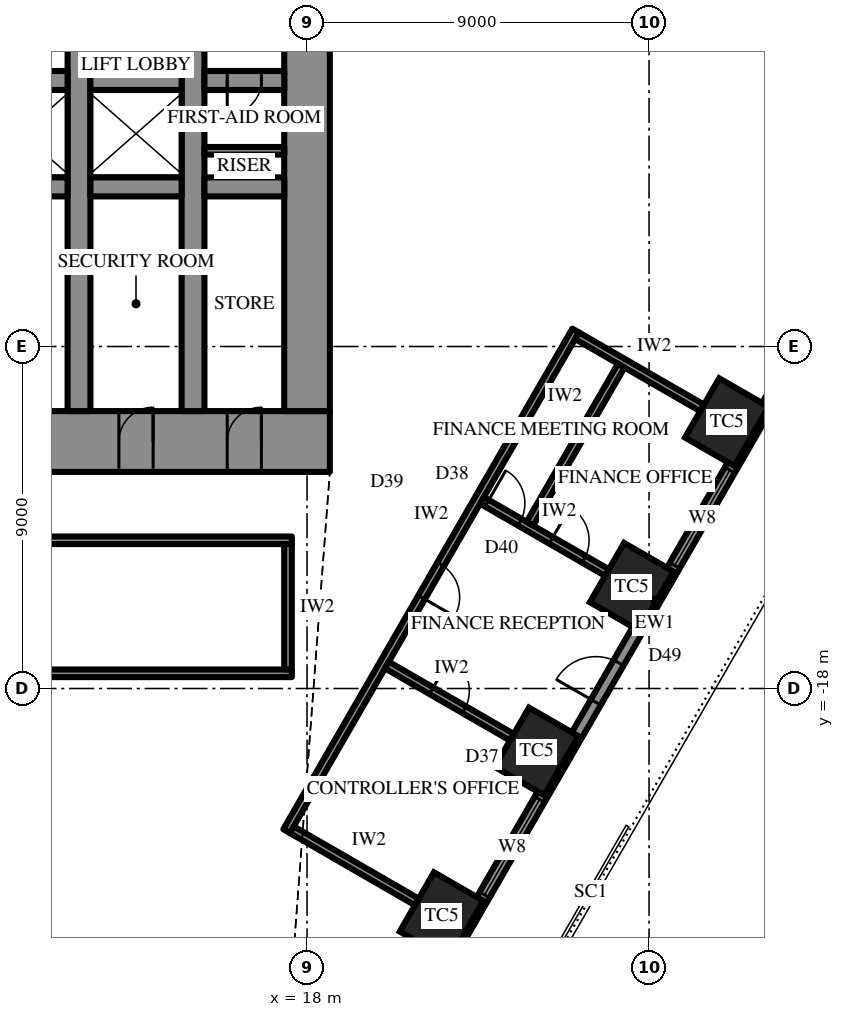
"""IFC4 building model, lengths in metres.
Left out: names, types, materials, properties, quantities, classifications, styles, units other than length and angle.
Written with IfcOpenShell. Run it as: python <this file> out.ifc"""

import sys

from ifc_helpers import new_model, si_unit, direction, frame, frame_2d, origin, origin_2d, place, context, subcontext, project, spatial, rectangle, extrude, element, fill, save


model = new_model("IFC4")
c1 = context("Model", 3, precision=1e-05, world=origin(), true_north=direction((0.0, 1.0)))
c2 = subcontext(c1, "Body", "Model", "MODEL_VIEW")
j1 = project(units=[si_unit("LENGTHUNIT", "METRE"), si_unit("PLANEANGLEUNIT", "RADIAN")], contexts=[c1])
p1 = place(None, origin())
s1 = spatial("IfcSite", under=j1, at=p1, CompositionType="ELEMENT")
p2 = place(p1, origin())
s2 = spatial("IfcBuilding", under=s1, at=p2, CompositionType="ELEMENT")
p3 = place(p2, frame((0.0, 0.0, 123.7)))
s3 = spatial("IfcBuildingStorey", under=s2, at=p3, CompositionType="ELEMENT", Elevation=123.7)
for number, where, z_axis, x_axis in (
    (1, (21.54, -23.992, 0.0), (0.0, 0.0, 1.0), (0.5, 0.866, 0.0)),
    (2, (24.042, -19.658, 0.0), (0.0, 0.0, 1.0), (0.5, 0.866, 0.0)),
    (3, (26.544, -15.325, 0.0), (0.0, 0.0, 1.0), (0.5, 0.866, 0.0)),
    (4, (29.045, -10.992, 0.0), (0.0, 0.0, 1.0), (0.5, 0.866, 0.0)),
):
    element("IfcColumn", number, at=place(p3, frame(where, z_axis=z_axis, x_axis=x_axis)), inside=s3, PredefinedType="COLUMN", context=c2, shape_type="SweptSolid", body=[
        extrude(rectangle(XDim=1.8, YDim=1.5, at=origin_2d()), origin(), (0.0, 0.0, 1.0), 4.2),
    ])
p4 = place(p3, frame((18.6, -11.5, 0.0), z_axis=(0.0, 0.0, 1.0), x_axis=(-1.0, 0.0, 0.0)))
e5 = element("IfcWall", 5, at=p4, inside=s3, PredefinedType="SHEAR", context=c2, shape_type="SweptSolid", body=[
    extrude(rectangle(XDim=37.2, YDim=1.6, at=frame_2d((18.6, 0.0))), origin(), (0.0, 0.0, 1.0), 4.2),
])
p5 = place(p4, frame((19.45, 0.0, 0.0)))
e6 = element("IfcOpeningElement", 6, at=p5, cuts=e5, PredefinedType="OPENING", context=c2, shape_type="SweptSolid", body=[
    extrude(rectangle(XDim=0.9, YDim=2.2, at=frame_2d((0.45, 1.1))), frame((0.0, 0.81, 0.0), z_axis=(0.0, -1.0, 0.0), x_axis=(1.0, 0.0, 0.0)), (0.0, 0.0, 1.0), 1.62),
])
p6 = place(p4, frame((22.45, 0.0, 0.0)))
e7 = element("IfcOpeningElement", 7, at=p6, cuts=e5, PredefinedType="OPENING", context=c2, shape_type="SweptSolid", body=[
    extrude(rectangle(XDim=0.9, YDim=2.2, at=frame_2d((0.45, 1.1))), frame((0.0, 0.81, 0.0), z_axis=(0.0, -1.0, 0.0), x_axis=(1.0, 0.0, 0.0)), (0.0, 0.0, 1.0), 1.62),
])
p7 = place(p4, frame((25.5, 0.0, 0.0)))
e8 = element("IfcOpeningElement", 8, at=p7, cuts=e5, PredefinedType="OPENING", context=c2, shape_type="SweptSolid", body=[
    extrude(rectangle(XDim=1.0, YDim=2.2, at=frame_2d((0.5, 1.1))), frame((0.0, 0.81, 0.0), z_axis=(0.0, -1.0, 0.0), x_axis=(1.0, 0.0, 0.0)), (0.0, 0.0, 1.0), 1.62),
])
p8 = place(p4, frame((1.8, 0.0, 0.0)))
e9 = element("IfcOpeningElement", 9, at=p8, cuts=e5, PredefinedType="OPENING", context=c2, shape_type="SweptSolid", body=[
    extrude(rectangle(XDim=0.9, YDim=2.2, at=frame_2d((0.45, 1.1))), frame((0.0, 0.81, 0.0), z_axis=(0.0, -1.0, 0.0), x_axis=(1.0, 0.0, 0.0)), (0.0, 0.0, 1.0), 1.62),
])
p9 = place(p4, frame((4.65, 0.0, 0.0)))
e10 = element("IfcOpeningElement", 10, at=p9, cuts=e5, PredefinedType="OPENING", context=c2, shape_type="SweptSolid", body=[
    extrude(rectangle(XDim=0.9, YDim=2.2, at=frame_2d((0.45, 1.1))), frame((0.0, 0.81, 0.0), z_axis=(0.0, -1.0, 0.0), x_axis=(1.0, 0.0, 0.0)), (0.0, 0.0, 1.0), 1.62),
])
p10 = place(p4, frame((7.75, 0.0, 0.0)))
e11 = element("IfcOpeningElement", 11, at=p10, cuts=e5, PredefinedType="OPENING", context=c2, shape_type="SweptSolid", body=[
    extrude(rectangle(XDim=0.9, YDim=2.2, at=frame_2d((0.45, 1.1))), frame((0.0, 0.81, 0.0), z_axis=(0.0, -1.0, 0.0), x_axis=(1.0, 0.0, 0.0)), (0.0, 0.0, 1.0), 1.62),
])
p11 = place(p4, frame((28.55, 0.0, 0.0)))
e12 = element("IfcOpeningElement", 12, at=p11, cuts=e5, PredefinedType="OPENING", context=c2, shape_type="SweptSolid", body=[
    extrude(rectangle(XDim=0.9, YDim=2.2, at=frame_2d((0.45, 1.1))), frame((0.0, 0.81, 0.0), z_axis=(0.0, -1.0, 0.0), x_axis=(1.0, 0.0, 0.0)), (0.0, 0.0, 1.0), 1.62),
])
p12 = place(p4, frame((31.65, 0.0, 0.0)))
e13 = element("IfcOpeningElement", 13, at=p12, cuts=e5, PredefinedType="OPENING", context=c2, shape_type="SweptSolid", body=[
    extrude(rectangle(XDim=0.9, YDim=2.2, at=frame_2d((0.45, 1.1))), frame((0.0, 0.81, 0.0), z_axis=(0.0, -1.0, 0.0), x_axis=(1.0, 0.0, 0.0)), (0.0, 0.0, 1.0), 1.62),
])
p13 = place(p4, frame((34.5, 0.0, 0.0)))
e14 = element("IfcOpeningElement", 14, at=p13, cuts=e5, PredefinedType="OPENING", context=c2, shape_type="SweptSolid", body=[
    extrude(rectangle(XDim=0.9, YDim=2.2, at=frame_2d((0.45, 1.1))), frame((0.0, 0.81, 0.0), z_axis=(0.0, -1.0, 0.0), x_axis=(1.0, 0.0, 0.0)), (0.0, 0.0, 1.0), 1.62),
])
p14 = place(p3, frame((18.0, -10.7, 0.0), z_axis=(0.0, 0.0, 1.0), x_axis=(0.0, 1.0, 0.0)))
e15 = element("IfcWall", 15, at=p14, inside=s3, PredefinedType="SHEAR", context=c2, shape_type="SweptSolid", body=[
    extrude(rectangle(XDim=21.4, YDim=1.2, at=frame_2d((10.7, 0.0))), origin(), (0.0, 0.0, 1.0), 4.2),
])
p15 = place(p14, frame((9.8, 0.0, 0.0)))
e16 = element("IfcOpeningElement", 16, at=p15, cuts=e15, PredefinedType="OPENING", context=c2, shape_type="SweptSolid", body=[
    extrude(rectangle(XDim=1.8, YDim=2.4, at=frame_2d((0.9, 1.2))), frame((0.0, 0.61, 0.0), z_axis=(0.0, -1.0, 0.0), x_axis=(1.0, 0.0, 0.0)), (0.0, 0.0, 1.0), 1.22),
])
p16 = place(p3, frame((12.0, -10.7, 0.0), z_axis=(0.0, 0.0, 1.0), x_axis=(0.0, 1.0, 0.0)))
e17 = element("IfcWall", 17, at=p16, inside=s3, PredefinedType="SHEAR", context=c2, shape_type="SweptSolid", body=[
    extrude(rectangle(XDim=21.4, YDim=0.6, at=frame_2d((10.7, 0.0))), origin(), (0.0, 0.0, 1.0), 4.2),
])
p17 = place(p16, frame((9.8, 0.0, 0.0)))
e18 = element("IfcOpeningElement", 18, at=p17, cuts=e17, PredefinedType="OPENING", context=c2, shape_type="SweptSolid", body=[
    extrude(rectangle(XDim=1.8, YDim=2.4, at=frame_2d((0.9, 1.2))), frame((0.0, 0.31, 0.0), z_axis=(0.0, -1.0, 0.0), x_axis=(1.0, 0.0, 0.0)), (0.0, 0.0, 1.0), 0.62),
])
p18 = place(p3, frame((15.0, -10.7, 0.0), z_axis=(0.0, 0.0, 1.0), x_axis=(0.0, 1.0, 0.0)))
e19 = element("IfcWall", 19, at=p18, inside=s3, PredefinedType="SHEAR", context=c2, shape_type="SweptSolid", body=[
    extrude(rectangle(XDim=21.4, YDim=0.6, at=frame_2d((10.7, 0.0))), origin(), (0.0, 0.0, 1.0), 4.2),
])
p19 = place(p18, frame((9.8, 0.0, 0.0)))
e20 = element("IfcOpeningElement", 20, at=p19, cuts=e19, PredefinedType="OPENING", context=c2, shape_type="SweptSolid", body=[
    extrude(rectangle(XDim=1.8, YDim=2.4, at=frame_2d((0.9, 1.2))), frame((0.0, 0.31, 0.0), z_axis=(0.0, -1.0, 0.0), x_axis=(1.0, 0.0, 0.0)), (0.0, 0.0, 1.0), 0.62),
])
p20 = place(p3, frame((17.4, -2.0, 0.0), z_axis=(0.0, 0.0, 1.0), x_axis=(-1.0, 0.0, 0.0)))
e21 = element("IfcWall", 21, at=p20, inside=s3, PredefinedType="SHEAR", context=c2, shape_type="SweptSolid", body=[
    extrude(rectangle(XDim=2.1, YDim=0.5, at=frame_2d((1.05, 0.0))), origin(), (0.0, 0.0, 1.0), 4.2),
])
p21 = place(p20, frame((0.6, 0.0, 0.0)))
e22 = element("IfcOpeningElement", 22, at=p21, cuts=e21, PredefinedType="OPENING", context=c2, shape_type="SweptSolid", body=[
    extrude(rectangle(XDim=0.9, YDim=2.2, at=frame_2d((0.45, 1.1))), frame((0.0, 0.26, 0.0), z_axis=(0.0, -1.0, 0.0), x_axis=(1.0, 0.0, 0.0)), (0.0, 0.0, 1.0), 0.52),
])
p22 = place(p3, frame((14.7, -2.0, 0.0), z_axis=(0.0, 0.0, 1.0), x_axis=(-1.0, 0.0, 0.0)))
e23 = element("IfcWall", 23, at=p22, inside=s3, PredefinedType="SHEAR", context=c2, shape_type="SweptSolid", body=[
    extrude(rectangle(XDim=2.4, YDim=0.5, at=frame_2d((1.2, 0.0))), origin(), (0.0, 0.0, 1.0), 4.2),
])
p23 = place(p3, frame((11.7, -2.0, 0.0), z_axis=(0.0, 0.0, 1.0), x_axis=(-1.0, 0.0, 0.0)))
e24 = element("IfcWall", 24, at=p23, inside=s3, PredefinedType="SHEAR", context=c2, shape_type="SweptSolid", body=[
    extrude(rectangle(XDim=5.9, YDim=0.5, at=frame_2d((2.95, 0.0))), origin(), (0.0, 0.0, 1.0), 4.2),
])
p24 = place(p3, frame((17.4, -4.8, 0.0), z_axis=(0.0, 0.0, 1.0), x_axis=(-1.0, 0.0, 0.0)))
e25 = element("IfcWall", 25, at=p24, inside=s3, PredefinedType="SHEAR", context=c2, shape_type="SweptSolid", body=[
    extrude(rectangle(XDim=2.1, YDim=0.5, at=frame_2d((1.05, 0.0))), origin(), (0.0, 0.0, 1.0), 4.2),
])
p25 = place(p3, frame((14.7, -4.8, 0.0), z_axis=(0.0, 0.0, 1.0), x_axis=(-1.0, 0.0, 0.0)))
e26 = element("IfcWall", 26, at=p25, inside=s3, PredefinedType="SHEAR", context=c2, shape_type="SweptSolid", body=[
    extrude(rectangle(XDim=2.4, YDim=0.5, at=frame_2d((1.2, 0.0))), origin(), (0.0, 0.0, 1.0), 4.2),
])
p26 = place(p3, frame((11.7, -4.8, 0.0), z_axis=(0.0, 0.0, 1.0), x_axis=(-1.0, 0.0, 0.0)))
e27 = element("IfcWall", 27, at=p26, inside=s3, PredefinedType="SHEAR", context=c2, shape_type="SweptSolid", body=[
    extrude(rectangle(XDim=23.4, YDim=0.5, at=frame_2d((11.7, 0.0))), origin(), (0.0, 0.0, 1.0), 4.2),
])
p27 = place(p26, frame((6.6, 0.0, 0.0)))
e28 = element("IfcOpeningElement", 28, at=p27, cuts=e27, PredefinedType="OPENING", context=c2, shape_type="SweptSolid", body=[
    extrude(rectangle(XDim=1.2, YDim=2.2, at=frame_2d((0.6, 1.1))), frame((0.0, 0.26, 0.0), z_axis=(0.0, -1.0, 0.0), x_axis=(1.0, 0.0, 0.0)), (0.0, 0.0, 1.0), 0.52),
])
p28 = place(p26, frame((3.6, 0.0, 0.0)))
e29 = element("IfcOpeningElement", 29, at=p28, cuts=e27, PredefinedType="OPENING", context=c2, shape_type="SweptSolid", body=[
    extrude(rectangle(XDim=1.2, YDim=2.2, at=frame_2d((0.6, 1.1))), frame((0.0, 0.26, 0.0), z_axis=(0.0, -1.0, 0.0), x_axis=(1.0, 0.0, 0.0)), (0.0, 0.0, 1.0), 0.52),
])
p29 = place(p3, frame((19.644, -28.675, 0.0), z_axis=(0.0, 0.0, 1.0), x_axis=(0.500003084452, 0.866023622968, 0.0)))
e30 = element("IfcWall", 30, at=p29, inside=s3, PredefinedType="SOLIDWALL", context=c2, shape_type="SweptSolid", body=[
    extrude(rectangle(XDim=30.022, YDim=0.3, at=frame_2d((15.011, 0.0))), origin(), (0.0, 0.0, 1.0), 2.3),
])
p30 = place(p29, frame((1.052, 0.0, 0.6)))
e31 = element("IfcOpeningElement", 31, at=p30, cuts=e30, PredefinedType="OPENING", context=c2, shape_type="SweptSolid", body=[
    extrude(rectangle(XDim=2.9, YDim=1.45, at=frame_2d((1.45, 0.725))), frame((0.0, 0.16, 0.0), z_axis=(0.0, -1.0, 0.0), x_axis=(1.0, 0.0, 0.0)), (0.0, 0.0, 1.0), 0.32),
])
p31 = place(p29, frame((6.056, 0.0, 0.6)))
e32 = element("IfcOpeningElement", 32, at=p31, cuts=e30, PredefinedType="OPENING", context=c2, shape_type="SweptSolid", body=[
    extrude(rectangle(XDim=2.9, YDim=1.45, at=frame_2d((1.45, 0.725))), frame((0.0, 0.16, 0.0), z_axis=(0.0, -1.0, 0.0), x_axis=(1.0, 0.0, 0.0)), (0.0, 0.0, 1.0), 0.32),
])
p32 = place(p29, frame((11.909, 0.0, 0.0)))
e33 = element("IfcOpeningElement", 33, at=p32, cuts=e30, PredefinedType="OPENING", context=c2, shape_type="SweptSolid", body=[
    extrude(rectangle(XDim=1.2, YDim=2.2, at=frame_2d((0.6, 1.1))), frame((0.0, 0.16, 0.0), z_axis=(0.0, -1.0, 0.0), x_axis=(1.0, 0.0, 0.0)), (0.0, 0.0, 1.0), 0.32),
])
p33 = place(p29, frame((16.063, 0.0, 0.6)))
e34 = element("IfcOpeningElement", 34, at=p33, cuts=e30, PredefinedType="OPENING", context=c2, shape_type="SweptSolid", body=[
    extrude(rectangle(XDim=2.9, YDim=1.45, at=frame_2d((1.45, 0.725))), frame((0.0, 0.16, 0.0), z_axis=(0.0, -1.0, 0.0), x_axis=(1.0, 0.0, 0.0)), (0.0, 0.0, 1.0), 0.32),
])
p34 = place(p29, frame((21.067, 0.0, 0.6)))
e35 = element("IfcOpeningElement", 35, at=p34, cuts=e30, PredefinedType="OPENING", context=c2, shape_type="SweptSolid", body=[
    extrude(rectangle(XDim=2.9, YDim=1.45, at=frame_2d((1.45, 0.725))), frame((0.0, 0.16, 0.0), z_axis=(0.0, -1.0, 0.0), x_axis=(1.0, 0.0, 0.0)), (0.0, 0.0, 1.0), 0.32),
])
p35 = place(p29, frame((26.07, 0.0, 0.6)))
e36 = element("IfcOpeningElement", 36, at=p35, cuts=e30, PredefinedType="OPENING", context=c2, shape_type="SweptSolid", body=[
    extrude(rectangle(XDim=2.9, YDim=1.45, at=frame_2d((1.45, 0.725))), frame((0.0, 0.16, 0.0), z_axis=(0.0, -1.0, 0.0), x_axis=(1.0, 0.0, 0.0)), (0.0, 0.0, 1.0), 0.32),
])
p36 = place(p3, frame((17.4, -3.85, 0.0), z_axis=(0.0, 0.0, 1.0), x_axis=(-1.0, 0.0, 0.0)))
e37 = element("IfcWall", 37, at=p36, inside=s3, PredefinedType="PARTITIONING", context=c2, shape_type="SweptSolid", body=[
    extrude(rectangle(XDim=2.1, YDim=0.2, at=frame_2d((1.05, 0.0))), origin(), (0.0, 0.0, 1.0), 4.0),
])
p37 = place(p3, frame((17.6, -14.1, 0.0), z_axis=(0.0, 0.0, 1.0), x_axis=(-1.0, 0.0, 0.0)))
e38 = element("IfcWall", 38, at=p37, inside=s3, PredefinedType="PARTITIONING", context=c2, shape_type="SweptSolid", body=[
    extrude(rectangle(XDim=35.2, YDim=0.2, at=frame_2d((17.6, 0.0))), origin(), (0.0, 0.0, 1.0), 4.0),
])
p38 = place(p3, frame((17.6, -17.6, 0.0), z_axis=(0.0, 0.0, 1.0), x_axis=(-1.0, 0.0, 0.0)))
e39 = element("IfcWall", 39, at=p38, inside=s3, PredefinedType="PARTITIONING", context=c2, shape_type="SweptSolid", body=[
    extrude(rectangle(XDim=35.2, YDim=0.2, at=frame_2d((17.6, 0.0))), origin(), (0.0, 0.0, 1.0), 4.0),
])
p39 = place(p38, frame((7.95, 0.0, 0.0)))
e40 = element("IfcOpeningElement", 40, at=p39, cuts=e39, PredefinedType="OPENING", context=c2, shape_type="SweptSolid", body=[
    extrude(rectangle(XDim=1.8, YDim=2.4, at=frame_2d((0.9, 1.2))), frame((0.0, 0.11, 0.0), z_axis=(0.0, -1.0, 0.0), x_axis=(1.0, 0.0, 0.0)), (0.0, 0.0, 1.0), 0.22),
])
p40 = place(p38, frame((25.45, 0.0, 0.0)))
e41 = element("IfcOpeningElement", 41, at=p40, cuts=e39, PredefinedType="OPENING", context=c2, shape_type="SweptSolid", body=[
    extrude(rectangle(XDim=1.8, YDim=2.4, at=frame_2d((0.9, 1.2))), frame((0.0, 0.11, 0.0), z_axis=(0.0, -1.0, 0.0), x_axis=(1.0, 0.0, 0.0)), (0.0, 0.0, 1.0), 0.22),
])
p41 = place(p3, frame((17.5, -14.2, 0.0), z_axis=(0.0, 0.0, 1.0), x_axis=(0.0, -1.0, 0.0)))
e42 = element("IfcWall", 42, at=p41, inside=s3, PredefinedType="PARTITIONING", context=c2, shape_type="SweptSolid", body=[
    extrude(rectangle(XDim=3.3, YDim=0.2, at=frame_2d((1.65, 0.0))), origin(), (0.0, 0.0, 1.0), 4.0),
])
p42 = place(p3, frame((17.463, -21.753, 0.0), z_axis=(0.0, 0.0, 1.0), x_axis=(0.500010972563, 0.86601906868, 0.0)))
e43 = element("IfcWall", 43, at=p42, inside=s3, PredefinedType="PARTITIONING", context=c2, shape_type="SweptSolid", body=[
    extrude(rectangle(XDim=15.211, YDim=0.2, at=frame_2d((7.605, 0.0))), origin(), (0.0, 0.0, 1.0), 4.0),
])
p43 = place(p42, frame((7.105, 0.0, 0.0)))
e44 = element("IfcOpeningElement", 44, at=p43, cuts=e43, PredefinedType="OPENING", context=c2, shape_type="SweptSolid", body=[
    extrude(rectangle(XDim=1.0, YDim=2.2, at=frame_2d((0.5, 1.1))), frame((0.0, 0.11, 0.0), z_axis=(0.0, -1.0, 0.0), x_axis=(1.0, 0.0, 0.0)), (0.0, 0.0, 1.0), 0.22),
])
p44 = place(p3, frame((17.6, -21.717, 0.0), z_axis=(0.0, 0.0, 1.0), x_axis=(0.866000483506, -0.500043160704, 0.0)))
e45 = element("IfcWall", 45, at=p44, inside=s3, PredefinedType="PARTITIONING", context=c2, shape_type="SweptSolid", body=[
    extrude(rectangle(XDim=3.8, YDim=0.2, at=frame_2d((1.9, 0.0))), origin(), (0.0, 0.0, 1.0), 3.082),
])
p45 = place(p3, frame((20.101, -17.383, 0.0), z_axis=(0.0, 0.0, 1.0), x_axis=(0.86601654697, -0.500015340139, 0.0)))
e46 = element("IfcWall", 46, at=p45, inside=s3, PredefinedType="PARTITIONING", context=c2, shape_type="SweptSolid", body=[
    extrude(rectangle(XDim=3.8, YDim=0.2, at=frame_2d((1.9, 0.0))), origin(), (0.0, 0.0, 1.0), 3.082),
])
p46 = place(p45, frame((1.35, 0.0, 0.0)))
e47 = element("IfcOpeningElement", 47, at=p46, cuts=e46, PredefinedType="OPENING", context=c2, shape_type="SweptSolid", body=[
    extrude(rectangle(XDim=1.0, YDim=2.2, at=frame_2d((0.5, 1.1))), frame((0.0, 0.11, 0.0), z_axis=(0.0, -1.0, 0.0), x_axis=(1.0, 0.0, 0.0)), (0.0, 0.0, 1.0), 0.22),
])
p47 = place(p3, frame((22.603, -13.05, 0.0), z_axis=(0.0, 0.0, 1.0), x_axis=(0.866028304915, -0.499994975061, 0.0)))
e48 = element("IfcWall", 48, at=p47, inside=s3, PredefinedType="PARTITIONING", context=c2, shape_type="SweptSolid", body=[
    extrude(rectangle(XDim=3.8, YDim=0.2, at=frame_2d((1.9, 0.0))), origin(), (0.0, 0.0, 1.0), 4.0),
])
p48 = place(p47, frame((0.15, 0.0, 0.0)))
e49 = element("IfcOpeningElement", 49, at=p48, cuts=e48, PredefinedType="OPENING", context=c2, shape_type="SweptSolid", body=[
    extrude(rectangle(XDim=1.0, YDim=2.2, at=frame_2d((0.5, 1.1))), frame((0.0, 0.11, 0.0), z_axis=(0.0, -1.0, 0.0), x_axis=(1.0, 0.0, 0.0)), (0.0, 0.0, 1.0), 0.22),
])
p49 = place(p47, frame((2.1, 0.0, 0.0)))
e50 = element("IfcOpeningElement", 50, at=p49, cuts=e48, PredefinedType="OPENING", context=c2, shape_type="SweptSolid", body=[
    extrude(rectangle(XDim=1.0, YDim=2.2, at=frame_2d((0.5, 1.1))), frame((0.0, 0.11, 0.0), z_axis=(0.0, -1.0, 0.0), x_axis=(1.0, 0.0, 0.0)), (0.0, 0.0, 1.0), 0.22),
])
p50 = place(p3, frame((25.105, -8.717, 0.0), z_axis=(0.0, 0.0, 1.0), x_axis=(0.866000483506, -0.500043160704, 0.0)))
e51 = element("IfcWall", 51, at=p50, inside=s3, PredefinedType="PARTITIONING", context=c2, shape_type="SweptSolid", body=[
    extrude(rectangle(XDim=3.8, YDim=0.2, at=frame_2d((1.9, 0.0))), origin(), (0.0, 0.0, 1.0), 3.082),
])
p51 = place(p3, frame((23.866, -13.663, 0.0), z_axis=(0.0, 0.0, 1.0), x_axis=(0.499998147991, 0.86602647304, 0.0)))
e52 = element("IfcWall", 52, at=p51, inside=s3, PredefinedType="PARTITIONING", context=c2, shape_type="SweptSolid", body=[
    extrude(rectangle(XDim=4.804, YDim=0.2, at=frame_2d((2.402, 0.0))), origin(), (0.0, 0.0, 1.0), 4.0),
])
p52 = place(p31, origin())
e53 = element("IfcWindow", 53, at=p52, inside=s3, PartitioningType="SINGLE_PANEL", PredefinedType="WINDOW", context=c2, shape_type="SweptSolid", body=[
    extrude(rectangle(XDim=2.9, YDim=1.45, at=frame_2d((1.45, 0.725))), frame((0.0, 0.03, 0.0), z_axis=(0.0, -1.0, 0.0), x_axis=(1.0, 0.0, 0.0)), (0.0, 0.0, 1.0), 0.06),
])
fill(e32, e53)
p53 = place(p32, origin())
e54 = element("IfcDoor", 54, at=p53, inside=s3, OperationType="SINGLE_SWING_RIGHT", PredefinedType="DOOR", context=c2, shape_type="SweptSolid", body=[
    extrude(rectangle(XDim=1.2, YDim=2.2, at=frame_2d((0.6, 1.1))), frame((0.0, 0.025, 0.0), z_axis=(0.0, -1.0, 0.0), x_axis=(1.0, 0.0, 0.0)), (0.0, 0.0, 1.0), 0.05),
])
fill(e33, e54)
p54 = place(p33, origin())
e55 = element("IfcWindow", 55, at=p54, inside=s3, PartitioningType="SINGLE_PANEL", PredefinedType="WINDOW", context=c2, shape_type="SweptSolid", body=[
    extrude(rectangle(XDim=2.9, YDim=1.45, at=frame_2d((1.45, 0.725))), frame((0.0, 0.03, 0.0), z_axis=(0.0, -1.0, 0.0), x_axis=(1.0, 0.0, 0.0)), (0.0, 0.0, 1.0), 0.06),
])
fill(e34, e55)
p55 = place(p8, frame((0.9, 0.0, 0.0), z_axis=(0.0, 0.0, 1.0), x_axis=(-1.0, 0.0, 0.0)))
e56 = element("IfcDoor", 56, at=p55, inside=s3, OperationType="SINGLE_SWING_LEFT", PredefinedType="DOOR", context=c2, shape_type="SweptSolid", body=[
    extrude(rectangle(XDim=0.9, YDim=2.2, at=frame_2d((0.45, 1.1))), frame((0.0, 0.025, 0.0), z_axis=(0.0, -1.0, 0.0), x_axis=(1.0, 0.0, 0.0)), (0.0, 0.0, 1.0), 0.05),
])
fill(e9, e56)
p56 = place(p9, frame((0.9, 0.0, 0.0), z_axis=(0.0, 0.0, 1.0), x_axis=(-1.0, 0.0, 0.0)))
e57 = element("IfcDoor", 57, at=p56, inside=s3, OperationType="SINGLE_SWING_LEFT", PredefinedType="DOOR", context=c2, shape_type="SweptSolid", body=[
    extrude(rectangle(XDim=0.9, YDim=2.2, at=frame_2d((0.45, 1.1))), frame((0.0, 0.025, 0.0), z_axis=(0.0, -1.0, 0.0), x_axis=(1.0, 0.0, 0.0)), (0.0, 0.0, 1.0), 0.05),
])
fill(e10, e57)
p57 = place(p21, origin())
e58 = element("IfcDoor", 58, at=p57, inside=s3, OperationType="SINGLE_SWING_LEFT", PredefinedType="DOOR", context=c2, shape_type="SweptSolid", body=[
    extrude(rectangle(XDim=0.9, YDim=2.2, at=frame_2d((0.45, 1.1))), frame((0.0, 0.025, 0.0), z_axis=(0.0, -1.0, 0.0), x_axis=(1.0, 0.0, 0.0)), (0.0, 0.0, 1.0), 0.05),
])
fill(e22, e58)
p58 = place(p46, origin())
e59 = element("IfcDoor", 59, at=p58, inside=s3, OperationType="SINGLE_SWING_RIGHT", PredefinedType="DOOR", context=c2, shape_type="SweptSolid", body=[
    extrude(rectangle(XDim=1.0, YDim=2.2, at=frame_2d((0.5, 1.1))), frame((0.0, 0.025, 0.0), z_axis=(0.0, -1.0, 0.0), x_axis=(1.0, 0.0, 0.0)), (0.0, 0.0, 1.0), 0.05),
])
fill(e47, e59)
p59 = place(p43, frame((1.0, 0.0, 0.0), z_axis=(0.0, 0.0, 1.0), x_axis=(-1.0, 0.0, 0.0)))
e60 = element("IfcDoor", 60, at=p59, inside=s3, OperationType="SINGLE_SWING_LEFT", PredefinedType="DOOR", context=c2, shape_type="SweptSolid", body=[
    extrude(rectangle(XDim=1.0, YDim=2.2, at=frame_2d((0.5, 1.1))), frame((0.0, 0.025, 0.0), z_axis=(0.0, -1.0, 0.0), x_axis=(1.0, 0.0, 0.0)), (0.0, 0.0, 1.0), 0.05),
])
fill(e44, e60)
p60 = place(p48, origin())
e61 = element("IfcDoor", 61, at=p60, inside=s3, OperationType="SINGLE_SWING_RIGHT", PredefinedType="DOOR", context=c2, shape_type="SweptSolid", body=[
    extrude(rectangle(XDim=1.0, YDim=2.2, at=frame_2d((0.5, 1.1))), frame((0.0, 0.025, 0.0), z_axis=(0.0, -1.0, 0.0), x_axis=(1.0, 0.0, 0.0)), (0.0, 0.0, 1.0), 0.05),
])
fill(e49, e61)
p61 = place(p49, origin())
e62 = element("IfcDoor", 62, at=p61, inside=s3, OperationType="SINGLE_SWING_RIGHT", PredefinedType="DOOR", context=c2, shape_type="SweptSolid", body=[
    extrude(rectangle(XDim=1.0, YDim=2.2, at=frame_2d((0.5, 1.1))), frame((0.0, 0.025, 0.0), z_axis=(0.0, -1.0, 0.0), x_axis=(1.0, 0.0, 0.0)), (0.0, 0.0, 1.0), 0.05),
])
fill(e50, e62)
save(model, sys.argv[1])
